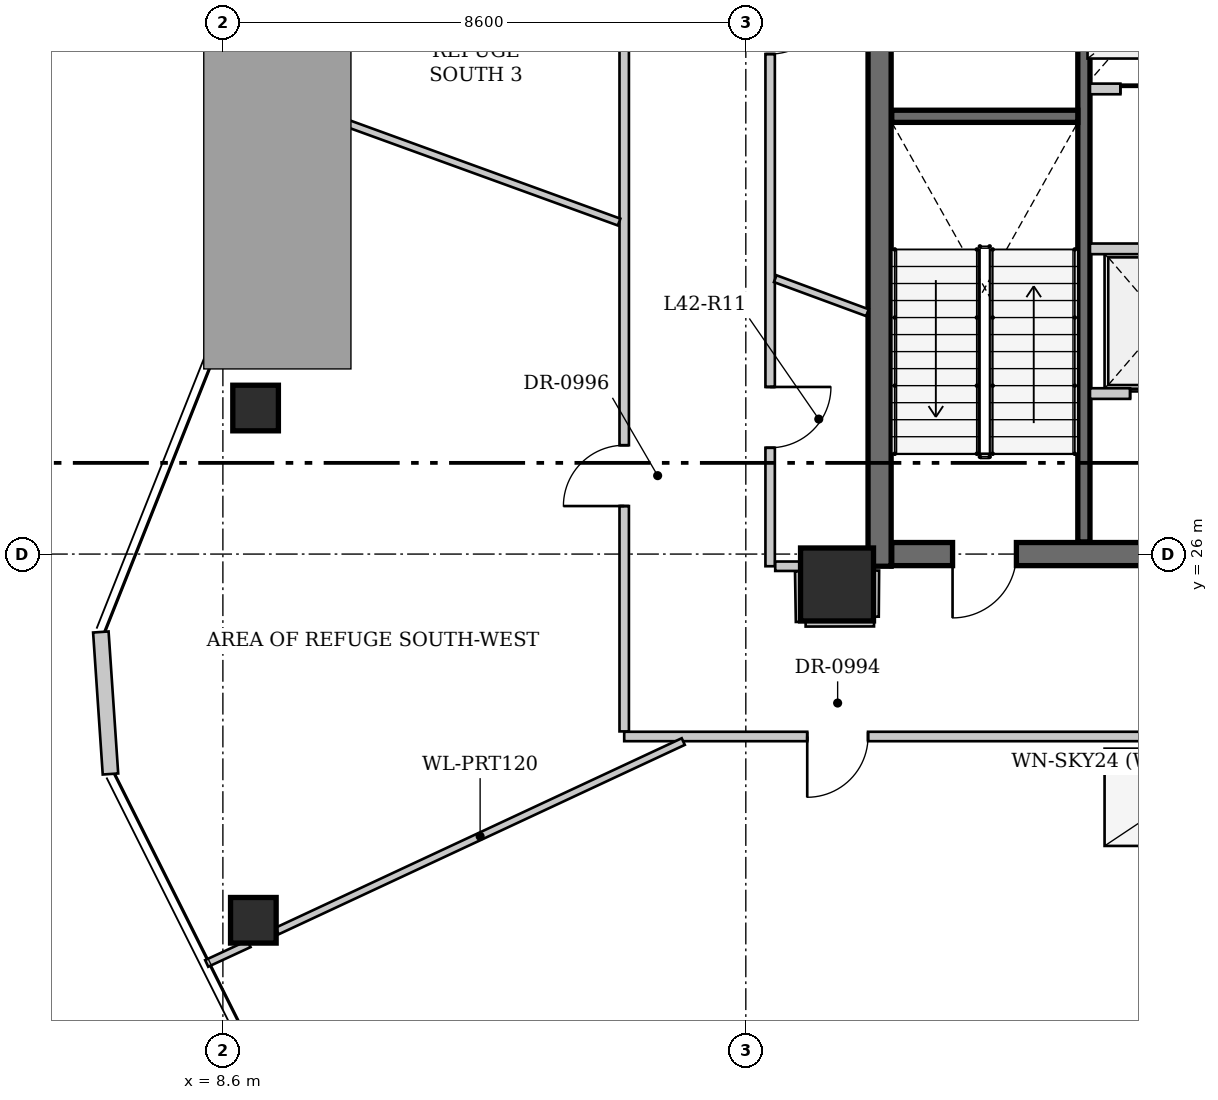
"""IFC4 building model, lengths in metres.
Left out: names, types, materials, properties, quantities, classifications, styles, units other than length and angle.
Written with IfcOpenShell. Run it as: python <this file> out.ifc"""

import sys

from ifc_helpers import new_model, si_unit, direction, frame, frame_2d, origin, origin_2d, place, context, subcontext, project, spatial, rectangle, hollow_rectangle, extrude, source, transform, mapped, element, fill, save


model = new_model("IFC4")
c1 = context("Model", 3, precision=1e-05, world=origin(), true_north=direction((0.0, 1.0)))
c2 = subcontext(c1, "Body", "Model", "MODEL_VIEW")
j1 = project(units=[si_unit("LENGTHUNIT", "METRE"), si_unit("PLANEANGLEUNIT", "RADIAN")], contexts=[c1])
p1 = place(None, origin())
s1 = spatial("IfcSite", under=j1, at=p1, CompositionType="ELEMENT")
p2 = place(p1, origin())
s2 = spatial("IfcBuilding", under=s1, at=p2, CompositionType="ELEMENT")
p3 = place(p2, frame((0.0, 0.0, 162.4)))
s3 = spatial("IfcBuildingStorey", under=s2, at=p3, CompositionType="ELEMENT", Elevation=162.4)
for number, where, z_axis, x_axis in (
    (1, (9.101, 19.977, 0.0), (0.0, 0.0, 1.0), (1.0, 0.0, 0.0)),
    (2, (9.138, 28.402, 0.0), (0.0, 0.0, 1.0), (1.0, 0.0, 0.0)),
):
    element("IfcColumn", number, at=place(p3, frame(where, z_axis=z_axis, x_axis=x_axis)), inside=s3, PredefinedType="COLUMN", context=c2, shape_type="SweptSolid", body=[
        extrude(hollow_rectangle(XDim=0.75, YDim=0.75, WallThickness=0.04, at=origin_2d()), origin(), (0.0, 0.0, 1.0), 4.15),
    ])
p4 = place(p3, frame((18.7, 25.5, 0.0), z_axis=(0.0, 0.0, 1.0), x_axis=(1.0, 0.0, 0.0)))
e3 = element("IfcColumn", 3, at=p4, inside=s3, PredefinedType="COLUMN", context=c2, shape_type="SweptSolid", body=[
    extrude(rectangle(XDim=1.2, YDim=1.2, at=origin_2d()), origin(), (0.0, 0.0, 1.0), 4.15),
])
p5 = place(p3, frame((6.751, 22.383, 0.0), z_axis=(0.0, 0.0, 1.0), x_axis=(-0.067585026107, 0.997713518123, 0.0)))
e4 = element("IfcWall", 4, at=p5, inside=s3, PredefinedType="SOLIDWALL", context=c2, shape_type="SweptSolid", body=[
    extrude(rectangle(XDim=2.341, YDim=0.255, at=frame_2d((1.17, 0.0))), origin(), (0.0, 0.0, 1.0), 4.15),
])
p6 = place(p3, frame((19.4, 25.8, 0.0), z_axis=(0.0, 0.0, 1.0), x_axis=(0.0, 1.0, 0.0)))
e5 = element("IfcWall", 5, at=p6, inside=s3, PredefinedType="SHEAR", context=c2, shape_type="SweptSolid", body=[
    extrude(rectangle(XDim=10.8, YDim=0.38, at=frame_2d((5.4, 0.0))), origin(), (0.0, 0.0, 1.0), 4.6),
])
p7 = place(p3, frame((32.4, 26.0, 0.0), z_axis=(0.0, 0.0, 1.0), x_axis=(-1.0, 0.0, 0.0)))
e6 = element("IfcWall", 6, at=p7, inside=s3, PredefinedType="SHEAR", context=c2, shape_type="SweptSolid", body=[
    extrude(rectangle(XDim=12.8, YDim=0.38, at=frame_2d((6.4, 0.0))), origin(), (0.0, 0.0, 1.0), 4.6),
])
p8 = place(p7, frame((10.75, 0.0, 0.0)))
e7 = element("IfcOpeningElement", 7, at=p8, cuts=e6, PredefinedType="OPENING", context=c2, shape_type="SweptSolid", body=[
    extrude(rectangle(XDim=1.05, YDim=2.15, at=frame_2d((0.525, 1.075))), frame((0.0, 0.2, 0.0), z_axis=(0.0, -1.0, 0.0), x_axis=(1.0, 0.0, 0.0)), (0.0, 0.0, 1.0), 0.4),
])
p9 = place(p7, frame((5.67, 0.0, 0.0)))
e8 = element("IfcOpeningElement", 8, at=p9, cuts=e6, PredefinedType="OPENING", context=c2, shape_type="SweptSolid", body=[
    extrude(rectangle(XDim=1.45, YDim=2.2, at=frame_2d((0.725, 1.1))), frame((0.0, 0.2, 0.0), z_axis=(0.0, -1.0, 0.0), x_axis=(1.0, 0.0, 0.0)), (0.0, 0.0, 1.0), 0.4),
])
p10 = place(p3, frame((22.76, 26.2, 0.0), z_axis=(0.0, 0.0, 1.0), x_axis=(0.0, 1.0, 0.0)))
e9 = element("IfcWall", 9, at=p10, inside=s3, PredefinedType="SHEAR", context=c2, shape_type="SweptSolid", body=[
    extrude(rectangle(XDim=10.0, YDim=0.2, at=frame_2d((5.0, 0.0))), origin(), (0.0, 0.0, 1.0), 4.6),
])
p11 = place(p3, frame((19.6, 33.2, 0.0), z_axis=(0.0, 0.0, 1.0), x_axis=(1.0, 0.0, 0.0)))
e10 = element("IfcWall", 10, at=p11, inside=s3, PredefinedType="SHEAR", context=c2, shape_type="SweptSolid", body=[
    extrude(rectangle(XDim=3.06, YDim=0.2, at=frame_2d((1.53, 0.0))), origin(), (0.0, 0.0, 1.0), 4.6),
])
p12 = place(p3, frame((22.86, 33.65, 0.0), z_axis=(0.0, 0.0, 1.0), x_axis=(1.0, 0.0, 0.0)))
e11 = element("IfcWall", 11, at=p12, inside=s3, PredefinedType="SOLIDWALL", context=c2, shape_type="SweptSolid", body=[
    extrude(rectangle(XDim=6.28, YDim=0.175, at=frame_2d((3.14, 0.0))), origin(), (0.0, 0.0, 1.0), 4.15),
])
p13 = place(p12, frame((0.5, 0.0, 0.0)))
e12 = element("IfcOpeningElement", 12, at=p13, cuts=e11, PredefinedType="OPENING", context=c2, shape_type="SweptSolid", body=[
    extrude(rectangle(XDim=1.05, YDim=2.15, at=frame_2d((0.525, 1.075))), frame((0.0, 0.098, 0.0), z_axis=(0.0, -1.0, 0.0), x_axis=(1.0, 0.0, 0.0)), (0.0, 0.0, 1.0), 0.195),
])
p14 = place(p12, frame((2.76, 0.0, 0.0)))
e13 = element("IfcOpeningElement", 13, at=p14, cuts=e11, PredefinedType="OPENING", context=c2, shape_type="SweptSolid", body=[
    extrude(rectangle(XDim=1.05, YDim=2.15, at=frame_2d((0.525, 1.075))), frame((0.0, 0.098, 0.0), z_axis=(0.0, -1.0, 0.0), x_axis=(1.0, 0.0, 0.0)), (0.0, 0.0, 1.0), 0.195),
])
p15 = place(p12, frame((4.9, 0.0, 0.0)))
e14 = element("IfcOpeningElement", 14, at=p15, cuts=e11, PredefinedType="OPENING", context=c2, shape_type="SweptSolid", body=[
    extrude(rectangle(XDim=1.05, YDim=2.15, at=frame_2d((0.525, 1.075))), frame((0.0, 0.098, 0.0), z_axis=(0.0, -1.0, 0.0), x_axis=(1.0, 0.0, 0.0)), (0.0, 0.0, 1.0), 0.195),
])
p16 = place(p3, frame((22.86, 31.02, 0.0), z_axis=(0.0, 0.0, 1.0), x_axis=(1.0, 0.0, 0.0)))
e15 = element("IfcWall", 15, at=p16, inside=s3, PredefinedType="SOLIDWALL", context=c2, shape_type="SweptSolid", body=[
    extrude(rectangle(XDim=6.28, YDim=0.175, at=frame_2d((3.14, 0.0))), origin(), (0.0, 0.0, 1.0), 4.15),
])
p17 = place(p3, frame((22.86, 28.64, 0.0), z_axis=(0.0, 0.0, 1.0), x_axis=(1.0, 0.0, 0.0)))
e16 = element("IfcWall", 16, at=p17, inside=s3, PredefinedType="SOLIDWALL", context=c2, shape_type="SweptSolid", body=[
    extrude(rectangle(XDim=6.28, YDim=0.175, at=frame_2d((3.14, 0.0))), origin(), (0.0, 0.0, 1.0), 4.15),
])
p18 = place(p17, frame((0.66, 0.0, 0.0)))
e17 = element("IfcOpeningElement", 17, at=p18, cuts=e16, PredefinedType="OPENING", context=c2, shape_type="SweptSolid", body=[
    extrude(rectangle(XDim=1.05, YDim=2.15, at=frame_2d((0.525, 1.075))), frame((0.0, 0.098, 0.0), z_axis=(0.0, -1.0, 0.0), x_axis=(1.0, 0.0, 0.0)), (0.0, 0.0, 1.0), 0.195),
])
p19 = place(p17, frame((2.62, 0.0, 0.0)))
e18 = element("IfcOpeningElement", 18, at=p19, cuts=e16, PredefinedType="OPENING", context=c2, shape_type="SweptSolid", body=[
    extrude(rectangle(XDim=1.05, YDim=2.15, at=frame_2d((0.525, 1.075))), frame((0.0, 0.098, 0.0), z_axis=(0.0, -1.0, 0.0), x_axis=(1.0, 0.0, 0.0)), (0.0, 0.0, 1.0), 0.195),
])
p20 = place(p17, frame((4.56, 0.0, 0.0)))
e19 = element("IfcOpeningElement", 19, at=p20, cuts=e16, PredefinedType="OPENING", context=c2, shape_type="SweptSolid", body=[
    extrude(rectangle(XDim=1.05, YDim=2.15, at=frame_2d((0.525, 1.075))), frame((0.0, 0.098, 0.0), z_axis=(0.0, -1.0, 0.0), x_axis=(1.0, 0.0, 0.0)), (0.0, 0.0, 1.0), 0.195),
])
p21 = place(p3, frame((35.717, 23.0, 0.0), z_axis=(0.0, 0.0, 1.0), x_axis=(-1.0, 0.0, 0.0)))
e20 = element("IfcWall", 20, at=p21, inside=s3, PredefinedType="PARTITIONING", context=c2, shape_type="SweptSolid", body=[
    extrude(rectangle(XDim=20.517, YDim=0.155, at=frame_2d((10.258, 0.0))), origin(), (0.0, 0.0, 1.0), 4.15),
])
p22 = place(p21, frame((16.507, 0.0, 0.0)))
e21 = element("IfcOpeningElement", 21, at=p22, cuts=e20, PredefinedType="OPENING", context=c2, shape_type="SweptSolid", body=[
    extrude(rectangle(XDim=1.0, YDim=2.15, at=frame_2d((0.5, 1.075))), frame((0.0, 0.087, 0.0), z_axis=(0.0, -1.0, 0.0), x_axis=(1.0, 0.0, 0.0)), (0.0, 0.0, 1.0), 0.175),
])
p23 = place(p21, frame((3.337, 0.0, 0.0)))
e22 = element("IfcOpeningElement", 22, at=p23, cuts=e20, PredefinedType="OPENING", context=c2, shape_type="SweptSolid", body=[
    extrude(rectangle(XDim=1.0, YDim=2.15, at=frame_2d((0.5, 1.075))), frame((0.0, 0.087, 0.0), z_axis=(0.0, -1.0, 0.0), x_axis=(1.0, 0.0, 0.0)), (0.0, 0.0, 1.0), 0.175),
])
p24 = place(p3, frame((15.2, 23.083, 0.0), z_axis=(0.0, 0.0, 1.0), x_axis=(0.0, 1.0, 0.0)))
e23 = element("IfcWall", 23, at=p24, inside=s3, PredefinedType="PARTITIONING", context=c2, shape_type="SweptSolid", body=[
    extrude(rectangle(XDim=18.19, YDim=0.155, at=frame_2d((9.095, 0.0))), origin(), (0.0, 0.0, 1.0), 4.15),
])
p25 = place(p24, frame((3.706, 0.0, 0.0)))
e24 = element("IfcOpeningElement", 24, at=p25, cuts=e23, PredefinedType="OPENING", context=c2, shape_type="SweptSolid", body=[
    extrude(rectangle(XDim=1.0, YDim=2.15, at=frame_2d((0.5, 1.075))), frame((0.0, 0.087, 0.0), z_axis=(0.0, -1.0, 0.0), x_axis=(1.0, 0.0, 0.0)), (0.0, 0.0, 1.0), 0.175),
])
p26 = place(p24, frame((12.492, 0.0, 0.0)))
e25 = element("IfcOpeningElement", 25, at=p26, cuts=e23, PredefinedType="OPENING", context=c2, shape_type="SweptSolid", body=[
    extrude(rectangle(XDim=1.0, YDim=2.15, at=frame_2d((0.5, 1.075))), frame((0.0, 0.087, 0.0), z_axis=(0.0, -1.0, 0.0), x_axis=(1.0, 0.0, 0.0)), (0.0, 0.0, 1.0), 0.175),
])
p27 = place(p3, frame((17.6, 39.04, 0.0), z_axis=(0.0, 0.0, 1.0), x_axis=(0.0, -1.0, 0.0)))
e26 = element("IfcWall", 26, at=p27, inside=s3, PredefinedType="PARTITIONING", context=c2, shape_type="SweptSolid", body=[
    extrude(rectangle(XDim=13.24, YDim=0.155, at=frame_2d((6.62, 0.0))), origin(), (0.0, 0.0, 1.0), 4.15),
])
p28 = place(p27, frame((3.816, 0.0, 0.0)))
e27 = element("IfcOpeningElement", 27, at=p28, cuts=e26, PredefinedType="OPENING", context=c2, shape_type="SweptSolid", body=[
    extrude(rectangle(XDim=1.0, YDim=2.15, at=frame_2d((0.5, 1.075))), frame((0.0, 0.087, 0.0), z_axis=(0.0, -1.0, 0.0), x_axis=(1.0, 0.0, 0.0)), (0.0, 0.0, 1.0), 0.175),
])
p29 = place(p27, frame((10.292, 0.0, 0.0)))
e28 = element("IfcOpeningElement", 28, at=p29, cuts=e26, PredefinedType="OPENING", context=c2, shape_type="SweptSolid", body=[
    extrude(rectangle(XDim=1.0, YDim=2.15, at=frame_2d((0.5, 1.075))), frame((0.0, 0.087, 0.0), z_axis=(0.0, -1.0, 0.0), x_axis=(1.0, 0.0, 0.0)), (0.0, 0.0, 1.0), 0.175),
])
p30 = place(p3, frame((17.684, 25.8, 0.0), z_axis=(0.0, 0.0, 1.0), x_axis=(1.0, 0.0, 0.0)))
e29 = element("IfcWall", 29, at=p30, inside=s3, PredefinedType="PARTITIONING", context=c2, shape_type="SweptSolid", body=[
    extrude(rectangle(XDim=0.401, YDim=0.155, at=frame_2d((0.201, 0.0))), origin(), (0.0, 0.0, 1.0), 4.15),
])
p31 = place(p3, frame((18.086, 25.717, 0.0), z_axis=(0.0, 0.0, 1.0), x_axis=(0.016439351857, -0.999864864724, 0.0)))
e30 = element("IfcWall", 30, at=p31, inside=s3, PredefinedType="PARTITIONING", context=c2, shape_type="SweptSolid", body=[
    extrude(rectangle(XDim=0.832, YDim=0.155, at=frame_2d((0.416, 0.0))), origin(), (0.0, 0.0, 1.0), 2.725),
])
p32 = place(p3, frame((18.184, 24.885, 0.0), z_axis=(0.0, 0.0, 1.0), x_axis=(0.999998091829, 0.00195354522, 0.0)))
e31 = element("IfcWall", 31, at=p32, inside=s3, PredefinedType="PARTITIONING", context=c2, shape_type="SweptSolid", body=[
    extrude(rectangle(XDim=1.125, YDim=0.155, at=frame_2d((0.562, 0.0))), origin(), (0.0, 0.0, 1.0), 4.15),
])
p33 = place(p3, frame((19.309, 24.971, 0.0), z_axis=(0.0, 0.0, 1.0), x_axis=(0.007719293966, 0.999970205806, 0.0)))
e32 = element("IfcWall", 32, at=p33, inside=s3, PredefinedType="PARTITIONING", context=c2, shape_type="SweptSolid", body=[
    extrude(rectangle(XDim=0.759, YDim=0.155, at=frame_2d((0.379, 0.0))), origin(), (0.0, 0.0, 1.0), 2.725),
])
p34 = place(p3, frame((16.171, 22.917, 0.0), z_axis=(0.0, 0.0, 1.0), x_axis=(-0.906250813075, -0.422740421301, 0.0)))
e33 = element("IfcWall", 33, at=p34, inside=s3, PredefinedType="PARTITIONING", context=c2, shape_type="SweptSolid", body=[
    extrude(rectangle(XDim=7.372, YDim=0.12, at=frame_2d((3.686, 0.0))), origin(), (0.0, 0.0, 1.0), 2.725),
])
p35 = place(p3, frame((9.03, 19.59, 0.0), z_axis=(0.0, 0.0, 1.0), x_axis=(-0.907446695622, -0.420167222193, 0.0)))
e34 = element("IfcWall", 34, at=p35, inside=s3, PredefinedType="PARTITIONING", context=c2, shape_type="SweptSolid", body=[
    extrude(rectangle(XDim=0.768, YDim=0.12, at=frame_2d((0.384, 0.0))), origin(), (0.0, 0.0, 1.0), 4.15),
])
p36 = place(p3, frame((10.029, 33.309, 0.0), z_axis=(0.0, 0.0, 1.0), x_axis=(0.939892148961, -0.341471445836, 0.0)))
e35 = element("IfcWall", 35, at=p36, inside=s3, PredefinedType="PARTITIONING", context=c2, shape_type="SweptSolid", body=[
    extrude(rectangle(XDim=5.413, YDim=0.12, at=frame_2d((2.707, 0.0))), origin(), (0.0, 0.0, 1.0), 4.15),
])
p37 = place(p3, frame((19.2, 29.97, 0.0), z_axis=(0.0, 0.0, 1.0), x_axis=(-0.938208937942, 0.34606934098, 0.0)))
e36 = element("IfcWall", 36, at=p37, inside=s3, PredefinedType="PARTITIONING", context=c2, shape_type="SweptSolid", body=[
    extrude(rectangle(XDim=1.616, YDim=0.12, at=frame_2d((0.808, 0.0))), origin(), (0.0, 0.0, 1.0), 4.15),
])
p38 = place(p3, frame((0.0, 0.0, -0.35)))
p39 = place(p38, frame((24.3, 22.0, 0.3)))
e37 = element("IfcWindow", 37, at=p39, inside=s3, PartitioningType="SINGLE_PANEL", PredefinedType="SKYLIGHT", context=c2, shape_type="SweptSolid", body=[
    extrude(rectangle(XDim=2.4, YDim=1.6, at=origin_2d()), origin(), (0.0, 0.0, 1.0), 0.05),
])
m1 = source(origin(), c2, "Body", "SweptSolid", [
    extrude(rectangle(XDim=1.05, YDim=2.15, at=frame_2d((0.525, 1.075))), frame((0.0, 0.025, 0.0), z_axis=(0.0, -1.0, 0.0), x_axis=(1.0, 0.0, 0.0)), (0.0, 0.0, 1.0), 0.05),
])
p40 = place(p8, origin())
e38 = element("IfcDoor", 38, at=p40, inside=s3, OperationType="SINGLE_SWING_RIGHT", PredefinedType="DOOR", context=c2, shape_type="MappedRepresentation", body=[
    mapped(m1, transform((0.0, 0.0, 0.0), x_axis=(1.0, 0.0, 0.0), y_axis=(0.0, 1.0, 0.0), z_axis=(0.0, 0.0, 1.0), scale=1.0)),
])
fill(e7, e38)
m2 = source(origin(), c2, "Body", "SweptSolid", [
    extrude(rectangle(XDim=1.05, YDim=2.15, at=frame_2d((0.525, 1.075))), frame((0.0, 0.025, 0.0), z_axis=(0.0, -1.0, 0.0), x_axis=(1.0, 0.0, 0.0)), (0.0, 0.0, 1.0), 0.05),
])
p41 = place(p13, origin())
e39 = element("IfcDoor", 39, at=p41, inside=s3, OperationType="SLIDING_TO_LEFT", PredefinedType="DOOR", context=c2, shape_type="MappedRepresentation", body=[
    mapped(m2, transform((0.0, 0.0, 0.0), x_axis=(1.0, 0.0, 0.0), y_axis=(0.0, 1.0, 0.0), z_axis=(0.0, 0.0, 1.0), scale=1.0)),
])
fill(e12, e39)
p42 = place(p18, origin())
e40 = element("IfcDoor", 40, at=p42, inside=s3, OperationType="SLIDING_TO_LEFT", PredefinedType="DOOR", context=c2, shape_type="MappedRepresentation", body=[
    mapped(m2, transform((0.0, 0.0, 0.0), x_axis=(1.0, 0.0, 0.0), y_axis=(0.0, 1.0, 0.0), z_axis=(0.0, 0.0, 1.0), scale=1.0)),
])
fill(e17, e40)
m3 = source(origin(), c2, "Body", "SweptSolid", [
    extrude(rectangle(XDim=1.0, YDim=2.15, at=frame_2d((0.5, 1.075))), frame((0.0, 0.025, 0.0), z_axis=(0.0, -1.0, 0.0), x_axis=(1.0, 0.0, 0.0)), (0.0, 0.0, 1.0), 0.05),
])
p43 = place(p22, origin())
e41 = element("IfcDoor", 41, at=p43, inside=s3, OperationType="SINGLE_SWING_RIGHT", PredefinedType="DOOR", context=c2, shape_type="MappedRepresentation", body=[
    mapped(m3, transform((0.0, 0.0, 0.0), x_axis=(1.0, 0.0, 0.0), y_axis=(0.0, 1.0, 0.0), z_axis=(0.0, 0.0, 1.0), scale=1.0)),
])
fill(e21, e41)
p44 = place(p25, origin())
e42 = element("IfcDoor", 42, at=p44, inside=s3, OperationType="SINGLE_SWING_LEFT", PredefinedType="DOOR", context=c2, shape_type="MappedRepresentation", body=[
    mapped(m3, transform((0.0, 0.0, 0.0), x_axis=(1.0, 0.0, 0.0), y_axis=(0.0, 1.0, 0.0), z_axis=(0.0, 0.0, 1.0), scale=1.0)),
])
fill(e24, e42)
p45 = place(p28, origin())
e43 = element("IfcDoor", 43, at=p45, inside=s3, OperationType="SINGLE_SWING_LEFT", PredefinedType="DOOR", context=c2, shape_type="MappedRepresentation", body=[
    mapped(m3, transform((0.0, 0.0, 0.0), x_axis=(1.0, 0.0, 0.0), y_axis=(0.0, 1.0, 0.0), z_axis=(0.0, 0.0, 1.0), scale=1.0)),
])
fill(e27, e43)
p46 = place(p29, origin())
e44 = element("IfcDoor", 44, at=p46, inside=s3, OperationType="SINGLE_SWING_LEFT", PredefinedType="DOOR", context=c2, shape_type="MappedRepresentation", body=[
    mapped(m3, transform((0.0, 0.0, 0.0), x_axis=(1.0, 0.0, 0.0), y_axis=(0.0, 1.0, 0.0), z_axis=(0.0, 0.0, 1.0), scale=1.0)),
])
fill(e28, e44)
save(model, sys.argv[1])
